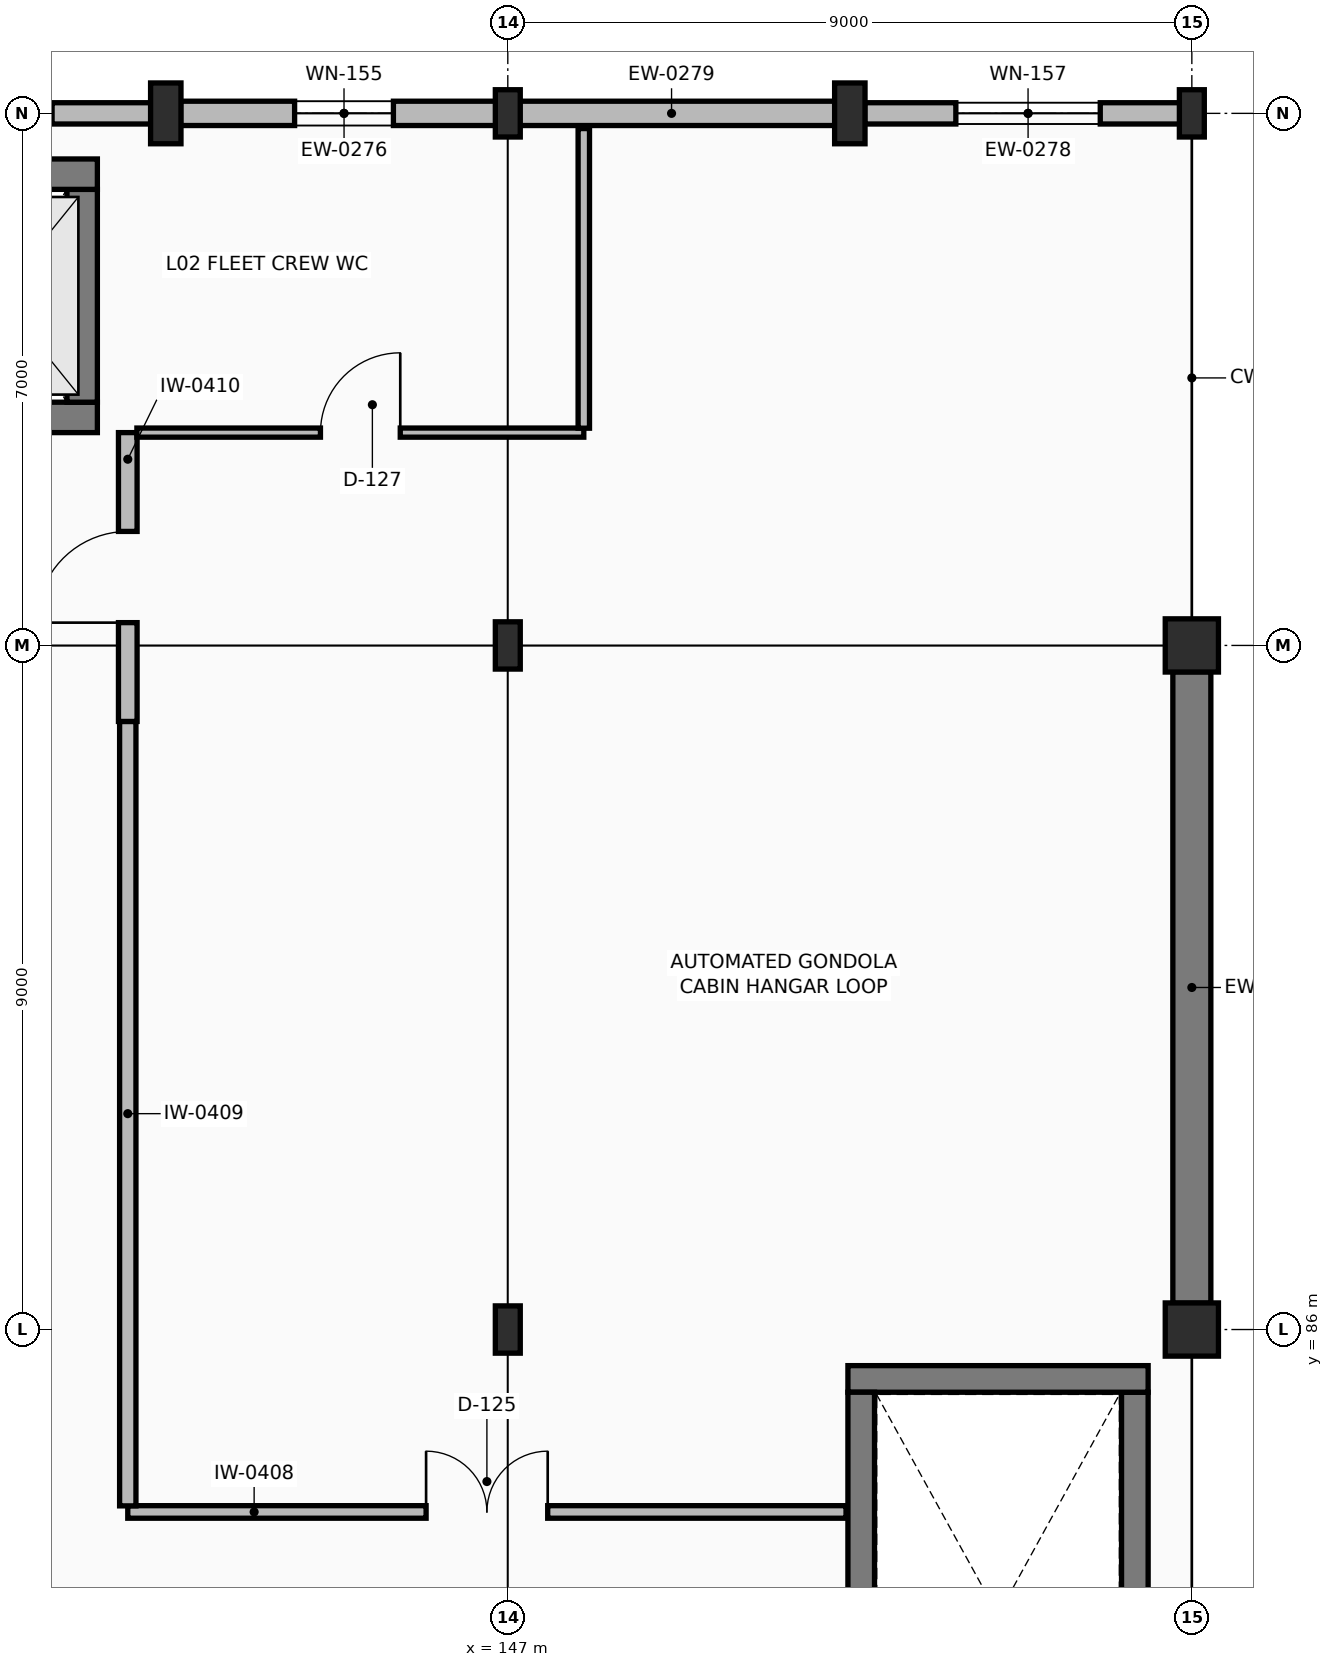
"""IFC4 building model, lengths in metres.
Left out: names, types, materials, properties, quantities, classifications, styles, units other than length and angle.
Written with IfcOpenShell. Run it as: python <this file> out.ifc"""

import sys

from ifc_helpers import new_model, si_unit, direction, frame, frame_2d, origin, origin_2d, place, context, subcontext, project, spatial, rectangle, i_section, extrude, element, fill, save


model = new_model("IFC4")
c1 = context("Model", 3, precision=1e-05, world=origin(), true_north=direction((0.0, 1.0)))
c2 = subcontext(c1, "Body", "Model", "MODEL_VIEW")
j1 = project(units=[si_unit("LENGTHUNIT", "METRE"), si_unit("PLANEANGLEUNIT", "RADIAN")], contexts=[c1])
p1 = place(None, origin())
s1 = spatial("IfcSite", under=j1, at=p1, CompositionType="ELEMENT")
p2 = place(p1, origin())
s2 = spatial("IfcBuilding", under=s1, at=p2, CompositionType="ELEMENT")
p3 = place(p2, frame((0.0, 0.0, 9.6)))
s3 = spatial("IfcBuildingStorey", under=s2, at=p3, CompositionType="ELEMENT", Elevation=9.6)
for number, where, z_axis, x_axis in (
    (1, (147.0, 86.0, 0.0), (0.0, 0.0, 1.0), (1.0, 0.0, 0.0)),
    (2, (147.0, 95.0, 0.0), (0.0, 0.0, 1.0), (1.0, 0.0, 0.0)),
    (3, (147.0, 102.0, 0.0), (0.0, 0.0, 1.0), (1.0, 0.0, 0.0)),
):
    element("IfcColumn", number, at=place(p3, frame(where, z_axis=z_axis, x_axis=x_axis)), inside=s3, PredefinedType="COLUMN", context=c2, shape_type="SweptSolid", body=[
        extrude(i_section(OverallWidth=0.328, OverallDepth=0.622, WebThickness=0.015, FlangeThickness=0.024, at=origin_2d()), origin(), (0.0, 0.0, 1.0), 4.8),
    ])
for number, where, z_axis, x_axis in (
    (4, (156.0, 86.0, 0.0), (0.0, 0.0, 1.0), (1.0, 0.0, 0.0)),
    (5, (156.0, 95.0, 0.0), (0.0, 0.0, 1.0), (1.0, 0.0, 0.0)),
):
    element("IfcColumn", number, at=place(p3, frame(where, z_axis=z_axis, x_axis=x_axis)), inside=s3, PredefinedType="COLUMN", context=c2, shape_type="SweptSolid", body=[
        extrude(rectangle(XDim=0.7, YDim=0.7, at=origin_2d()), origin(), (0.0, 0.0, 1.0), 4.8),
    ])
p4 = place(p3, frame((156.0, 102.0, 0.0), z_axis=(0.0, 0.0, 1.0), x_axis=(1.0, 0.0, 0.0)))
e6 = element("IfcColumn", 6, at=p4, inside=s3, PredefinedType="COLUMN", context=c2, shape_type="SweptSolid", body=[
    extrude(i_section(OverallWidth=0.328, OverallDepth=0.622, WebThickness=0.015, FlangeThickness=0.024, at=origin_2d()), origin(), (0.0, 0.0, 1.0), 4.8),
])
for number, where, z_axis, x_axis in (
    (7, (142.5, 102.0, 0.0), (0.0, 0.0, 1.0), (1.0, 0.0, 0.0)),
    (8, (151.5, 102.0, 0.0), (0.0, 0.0, 1.0), (1.0, 0.0, 0.0)),
):
    element("IfcColumn", number, at=place(p3, frame(where, z_axis=z_axis, x_axis=x_axis)), inside=s3, PredefinedType="PILASTER", context=c2, shape_type="SweptSolid", body=[
        extrude(rectangle(XDim=0.4, YDim=0.8, at=origin_2d()), origin(), (0.0, 0.0, 1.0), 4.8),
    ])
p5 = place(p3, frame((156.0, 86.345, 0.0), z_axis=(0.0, 0.0, 1.0), x_axis=(0.0, 1.0, 0.0)))
e9 = element("IfcWall", 9, at=p5, inside=s3, PredefinedType="SHEAR", context=c2, shape_type="SweptSolid", body=[
    extrude(rectangle(XDim=8.31, YDim=0.5, at=frame_2d((4.155, 0.0))), origin(), (0.0, 0.0, 1.0), 3.763),
])
p6 = place(p3, frame((146.996, 102.0, 0.0), z_axis=(0.0, 0.0, 1.0), x_axis=(-1.0, 0.0, 0.0)))
e10 = element("IfcWall", 10, at=p6, inside=s3, PredefinedType="SOLIDWALL", context=c2, shape_type="SweptSolid", body=[
    extrude(rectangle(XDim=4.301, YDim=0.32, at=frame_2d((2.15, 0.0))), origin(), (0.0, 0.0, 1.0), 4.225),
])
p7 = place(p6, frame((1.501, 0.0, 0.9)))
e11 = element("IfcOpeningElement", 11, at=p7, cuts=e10, PredefinedType="OPENING", context=c2, shape_type="SweptSolid", body=[
    extrude(rectangle(XDim=1.3, YDim=1.45, at=frame_2d((0.65, 0.725))), frame((0.0, 0.17, 0.0), z_axis=(0.0, -1.0, 0.0), x_axis=(1.0, 0.0, 0.0)), (0.0, 0.0, 1.0), 0.34),
])
p8 = place(p3, frame((142.305, 102.0, 0.0), z_axis=(0.0, 0.0, 1.0), x_axis=(-1.0, 0.0, 0.0)))
e12 = element("IfcWall", 12, at=p8, inside=s3, PredefinedType="SOLIDWALL", context=c2, shape_type="SweptSolid", body=[
    extrude(rectangle(XDim=4.301, YDim=0.28, at=frame_2d((2.15, 0.0))), origin(), (0.0, 0.0, 1.0), 4.225),
])
p9 = place(p8, frame((1.301, 0.0, 0.9)))
e13 = element("IfcOpeningElement", 13, at=p9, cuts=e12, PredefinedType="OPENING", context=c2, shape_type="SweptSolid", body=[
    extrude(rectangle(XDim=1.7, YDim=1.5, at=frame_2d((0.85, 0.75))), frame((0.0, 0.15, 0.0), z_axis=(0.0, -1.0, 0.0), x_axis=(1.0, 0.0, 0.0)), (0.0, 0.0, 1.0), 0.3),
])
p10 = place(p3, frame((155.996, 102.0, 0.0), z_axis=(0.0, 0.0, 1.0), x_axis=(-1.0, 0.0, 0.0)))
e14 = element("IfcWall", 14, at=p10, inside=s3, PredefinedType="SOLIDWALL", context=c2, shape_type="SweptSolid", body=[
    extrude(rectangle(XDim=4.301, YDim=0.28, at=frame_2d((2.15, 0.0))), origin(), (0.0, 0.0, 1.0), 4.225),
])
p11 = place(p10, frame((1.201, 0.0, 0.9)))
e15 = element("IfcOpeningElement", 15, at=p11, cuts=e14, PredefinedType="OPENING", context=c2, shape_type="SweptSolid", body=[
    extrude(rectangle(XDim=1.9, YDim=1.55, at=frame_2d((0.95, 0.775))), frame((0.0, 0.15, 0.0), z_axis=(0.0, -1.0, 0.0), x_axis=(1.0, 0.0, 0.0)), (0.0, 0.0, 1.0), 0.3),
])
p12 = place(p3, frame((151.305, 102.0, 0.0), z_axis=(0.0, 0.0, 1.0), x_axis=(-1.0, 0.0, 0.0)))
e16 = element("IfcWall", 16, at=p12, inside=s3, PredefinedType="SOLIDWALL", context=c2, shape_type="SweptSolid", body=[
    extrude(rectangle(XDim=4.301, YDim=0.32, at=frame_2d((2.15, 0.0))), origin(), (0.0, 0.0, 1.0), 4.225),
])
p13 = place(p3, frame((139.0, 98.0, 0.0), z_axis=(0.0, 0.0, 1.0), x_axis=(1.0, 0.0, 0.0)))
e17 = element("IfcWall", 17, at=p13, inside=s3, PredefinedType="SHEAR", context=c2, shape_type="SweptSolid", body=[
    extrude(rectangle(XDim=2.6, YDim=0.4, at=frame_2d((1.3, 0.0))), origin(), (0.0, 0.0, 1.0), 4.49),
])
p14 = place(p13, frame((0.65, 0.0, 0.0)))
e18 = element("IfcOpeningElement", 18, at=p14, cuts=e17, PredefinedType="OPENING", context=c2, shape_type="SweptSolid", body=[
    extrude(rectangle(XDim=1.3, YDim=2.25, at=frame_2d((0.65, 1.125))), frame((0.0, 0.21, 0.0), z_axis=(0.0, -1.0, 0.0), x_axis=(1.0, 0.0, 0.0)), (0.0, 0.0, 1.0), 0.42),
])
p15 = place(p3, frame((141.4, 98.2, 0.0), z_axis=(0.0, 0.0, 1.0), x_axis=(0.0, 1.0, 0.0)))
e19 = element("IfcWall", 19, at=p15, inside=s3, PredefinedType="SHEAR", context=c2, shape_type="SweptSolid", body=[
    extrude(rectangle(XDim=2.8, YDim=0.4, at=frame_2d((1.4, 0.0))), origin(), (0.0, 0.0, 1.0), 4.49),
])
p16 = place(p3, frame((141.6, 101.2, 0.0), z_axis=(0.0, 0.0, 1.0), x_axis=(-1.0, 0.0, 0.0)))
e20 = element("IfcWall", 20, at=p16, inside=s3, PredefinedType="SHEAR", context=c2, shape_type="SweptSolid", body=[
    extrude(rectangle(XDim=2.6, YDim=0.4, at=frame_2d((1.3, 0.0))), origin(), (0.0, 0.0, 1.0), 4.49),
])
p17 = place(p3, frame((155.25, 77.725, 0.0), z_axis=(0.0, 0.0, 1.0), x_axis=(0.0, 1.0, 0.0)))
e21 = element("IfcWall", 21, at=p17, inside=s3, PredefinedType="SHEAR", context=c2, shape_type="SweptSolid", body=[
    extrude(rectangle(XDim=7.45, YDim=0.35, at=frame_2d((3.725, 0.0))), origin(), (0.0, 0.0, 1.0), 4.49),
])
p18 = place(p3, frame((155.425, 85.35, 0.0), z_axis=(0.0, 0.0, 1.0), x_axis=(-1.0, 0.0, 0.0)))
e22 = element("IfcWall", 22, at=p18, inside=s3, PredefinedType="SHEAR", context=c2, shape_type="SweptSolid", body=[
    extrude(rectangle(XDim=3.95, YDim=0.35, at=frame_2d((1.975, 0.0))), origin(), (0.0, 0.0, 1.0), 4.49),
])
p19 = place(p3, frame((151.65, 85.175, 0.0), z_axis=(0.0, 0.0, 1.0), x_axis=(0.0, -1.0, 0.0)))
e23 = element("IfcWall", 23, at=p19, inside=s3, PredefinedType="SHEAR", context=c2, shape_type="SweptSolid", body=[
    extrude(rectangle(XDim=7.45, YDim=0.35, at=frame_2d((3.725, 0.0))), origin(), (0.0, 0.0, 1.0), 4.49),
])
p20 = place(p19, frame((6.0, 0.0, 0.0)))
e24 = element("IfcOpeningElement", 24, at=p20, cuts=e23, PredefinedType="OPENING", context=c2, shape_type="SweptSolid", body=[
    extrude(rectangle(XDim=1.1, YDim=2.2, at=frame_2d((0.55, 1.1))), frame((0.0, 0.185, 0.0), z_axis=(0.0, -1.0, 0.0), x_axis=(1.0, 0.0, 0.0)), (0.0, 0.0, 1.0), 0.37),
])
p21 = place(p3, frame((142.0, 83.6, 0.0), z_axis=(0.0, 0.0, 1.0), x_axis=(1.0, 0.0, 0.0)))
e25 = element("IfcWall", 25, at=p21, inside=s3, PredefinedType="PARTITIONING", context=c2, shape_type="SweptSolid", body=[
    extrude(rectangle(XDim=9.45, YDim=0.165, at=frame_2d((4.725, 0.0))), origin(), (0.0, 0.0, 1.0), 3.753),
])
p22 = place(p21, frame((3.925, 0.0, 0.0)))
e26 = element("IfcOpeningElement", 26, at=p22, cuts=e25, PredefinedType="OPENING", context=c2, shape_type="SweptSolid", body=[
    extrude(rectangle(XDim=1.6, YDim=2.25, at=frame_2d((0.8, 1.125))), frame((0.0, 0.093, 0.0), z_axis=(0.0, -1.0, 0.0), x_axis=(1.0, 0.0, 0.0)), (0.0, 0.0, 1.0), 0.185),
])
p23 = place(p3, frame((142.0, 83.68, 0.0), z_axis=(0.0, 0.0, 1.0), x_axis=(0.0, 1.0, 0.0)))
e27 = element("IfcWall", 27, at=p23, inside=s3, PredefinedType="PARTITIONING", context=c2, shape_type="SweptSolid", body=[
    extrude(rectangle(XDim=10.32, YDim=0.215, at=frame_2d((5.16, 0.0))), origin(), (0.0, 0.0, 1.0), 3.753),
])
p24 = place(p3, frame((142.0, 94.0, 0.0), z_axis=(0.0, 0.0, 1.0), x_axis=(0.0, 1.0, 0.0)))
e28 = element("IfcWall", 28, at=p24, inside=s3, PredefinedType="PARTITIONING", context=c2, shape_type="SweptSolid", body=[
    extrude(rectangle(XDim=3.8, YDim=0.245, at=frame_2d((1.9, 0.0))), origin(), (0.0, 0.0, 1.0), 3.753),
])
p25 = place(p24, frame((1.3, 0.0, 0.0)))
e29 = element("IfcOpeningElement", 29, at=p25, cuts=e28, PredefinedType="OPENING", context=c2, shape_type="SweptSolid", body=[
    extrude(rectangle(XDim=1.2, YDim=2.2, at=frame_2d((0.6, 1.1))), frame((0.0, 0.133, 0.0), z_axis=(0.0, -1.0, 0.0), x_axis=(1.0, 0.0, 0.0)), (0.0, 0.0, 1.0), 0.265),
])
p26 = place(p3, frame((142.12, 97.8, 0.0), z_axis=(0.0, 0.0, 1.0), x_axis=(1.0, 0.0, 0.0)))
e30 = element("IfcWall", 30, at=p26, inside=s3, PredefinedType="PARTITIONING", context=c2, shape_type="SweptSolid", body=[
    extrude(rectangle(XDim=5.88, YDim=0.12, at=frame_2d((2.94, 0.0))), origin(), (0.0, 0.0, 1.0), 3.753),
])
p27 = place(p26, frame((2.415, 0.0, 0.0)))
e31 = element("IfcOpeningElement", 31, at=p27, cuts=e30, PredefinedType="OPENING", context=c2, shape_type="SweptSolid", body=[
    extrude(rectangle(XDim=1.05, YDim=2.15, at=frame_2d((0.525, 1.075))), frame((0.0, 0.07, 0.0), z_axis=(0.0, -1.0, 0.0), x_axis=(1.0, 0.0, 0.0)), (0.0, 0.0, 1.0), 0.14),
])
p28 = place(p3, frame((148.0, 97.858, 0.0), z_axis=(0.0, 0.0, 1.0), x_axis=(0.0, 1.0, 0.0)))
e32 = element("IfcWall", 32, at=p28, inside=s3, PredefinedType="PARTITIONING", context=c2, shape_type="SweptSolid", body=[
    extrude(rectangle(XDim=3.942, YDim=0.15, at=frame_2d((1.971, 0.0))), origin(), (0.0, 0.0, 1.0), 4.435),
])
p29 = place(p7, origin())
e33 = element("IfcWindow", 33, at=p29, inside=s3, PartitioningType="SINGLE_PANEL", PredefinedType="WINDOW", context=c2, shape_type="SweptSolid", body=[
    extrude(rectangle(XDim=1.3, YDim=1.45, at=frame_2d((0.65, 0.725))), frame((0.0, 0.03, 0.0), z_axis=(0.0, -1.0, 0.0), x_axis=(1.0, 0.0, 0.0)), (0.0, 0.0, 1.0), 0.06),
])
fill(e11, e33)
p30 = place(p9, origin())
e34 = element("IfcWindow", 34, at=p30, inside=s3, PartitioningType="SINGLE_PANEL", PredefinedType="WINDOW", context=c2, shape_type="SweptSolid", body=[
    extrude(rectangle(XDim=1.7, YDim=1.5, at=frame_2d((0.85, 0.75))), frame((0.0, 0.03, 0.0), z_axis=(0.0, -1.0, 0.0), x_axis=(1.0, 0.0, 0.0)), (0.0, 0.0, 1.0), 0.06),
])
fill(e13, e34)
p31 = place(p11, origin())
e35 = element("IfcWindow", 35, at=p31, inside=s3, PartitioningType="SINGLE_PANEL", PredefinedType="WINDOW", context=c2, shape_type="SweptSolid", body=[
    extrude(rectangle(XDim=1.9, YDim=1.55, at=frame_2d((0.95, 0.775))), frame((0.0, 0.03, 0.0), z_axis=(0.0, -1.0, 0.0), x_axis=(1.0, 0.0, 0.0)), (0.0, 0.0, 1.0), 0.06),
])
fill(e15, e35)
p32 = place(p22, origin())
e36 = element("IfcDoor", 36, at=p32, inside=s3, OperationType="DOUBLE_SWING_RIGHT", PredefinedType="DOOR", context=c2, shape_type="SweptSolid", body=[
    extrude(rectangle(XDim=1.6, YDim=2.25, at=frame_2d((0.8, 1.125))), frame((0.0, 0.025, 0.0), z_axis=(0.0, -1.0, 0.0), x_axis=(1.0, 0.0, 0.0)), (0.0, 0.0, 1.0), 0.05),
])
fill(e26, e36)
p33 = place(p25, origin())
e37 = element("IfcDoor", 37, at=p33, inside=s3, OperationType="SINGLE_SWING_LEFT", PredefinedType="DOOR", context=c2, shape_type="SweptSolid", body=[
    extrude(rectangle(XDim=1.2, YDim=2.2, at=frame_2d((0.6, 1.1))), frame((0.0, 0.025, 0.0), z_axis=(0.0, -1.0, 0.0), x_axis=(1.0, 0.0, 0.0)), (0.0, 0.0, 1.0), 0.05),
])
fill(e29, e37)
p34 = place(p27, origin())
e38 = element("IfcDoor", 38, at=p34, inside=s3, OperationType="SINGLE_SWING_RIGHT", PredefinedType="DOOR", context=c2, shape_type="SweptSolid", body=[
    extrude(rectangle(XDim=1.05, YDim=2.15, at=frame_2d((0.525, 1.075))), frame((0.0, 0.025, 0.0), z_axis=(0.0, -1.0, 0.0), x_axis=(1.0, 0.0, 0.0)), (0.0, 0.0, 1.0), 0.05),
])
fill(e31, e38)
save(model, sys.argv[1])
